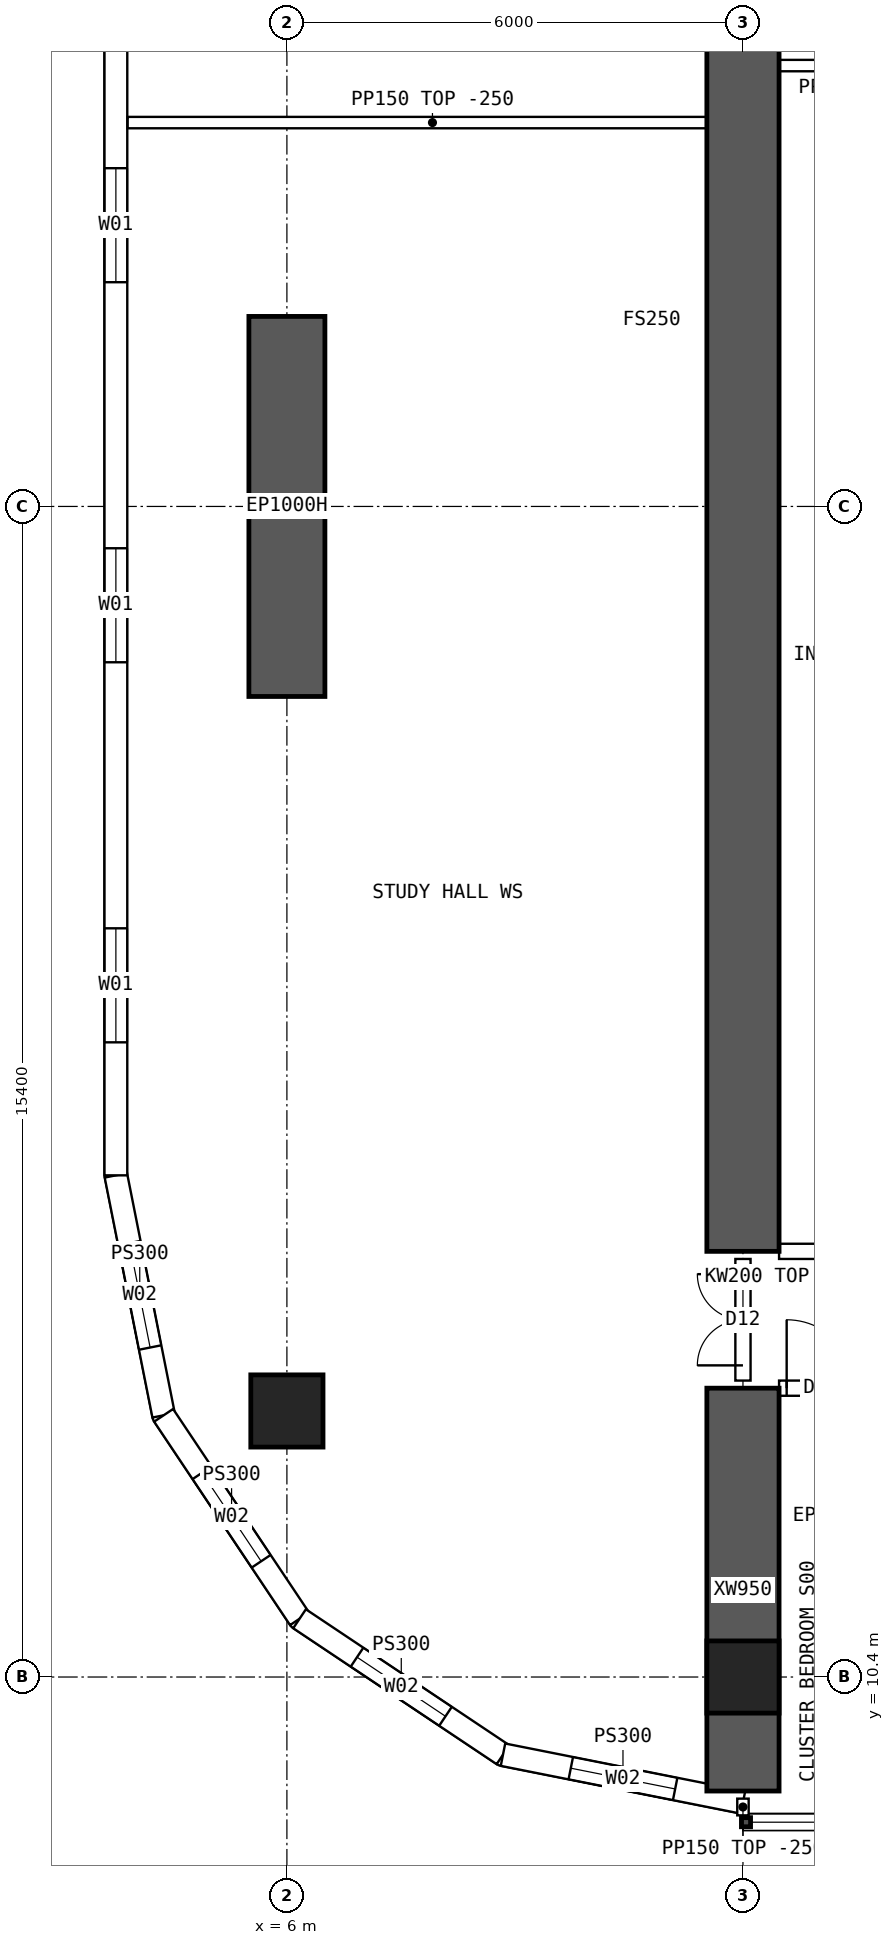
"""IFC4 building model, lengths in metres.
Left out: names, types, materials, properties, quantities, classifications, styles, units other than length and angle.
Written with IfcOpenShell. Run it as: python <this file> out.ifc"""

import sys

from ifc_helpers import new_model, si_unit, direction, frame, frame_2d, origin, origin_2d, place, context, subcontext, project, spatial, polyline, rectangle, hollow_rectangle, outline, extrude, element, fill, save


model = new_model("IFC4")
c1 = context("Model", 3, precision=1e-05, world=origin(), true_north=direction((0.0, 1.0)))
c2 = subcontext(c1, "Body", "Model", "MODEL_VIEW")
j1 = project(units=[si_unit("LENGTHUNIT", "METRE"), si_unit("PLANEANGLEUNIT", "RADIAN")], contexts=[c1])
p1 = place(None, origin())
s1 = spatial("IfcSite", under=j1, at=p1, CompositionType="ELEMENT")
p2 = place(p1, origin())
s2 = spatial("IfcBuilding", under=s1, at=p2, CompositionType="ELEMENT")
p3 = place(p2, frame((0.0, 0.0, 118.15)))
s3 = spatial("IfcBuildingStorey", under=s2, at=p3, CompositionType="ELEMENT", Elevation=118.15)
for number, where, z_axis, x_axis in (
    (1, (12.0, 10.4, 0.0), (0.0, 0.0, 1.0), (1.0, 0.0, 0.0)),
    (2, (6.0, 13.9, 0.0), (0.0, 0.0, 1.0), (1.0, 0.0, 0.0)),
):
    element("IfcColumn", number, at=place(p3, frame(where, z_axis=z_axis, x_axis=x_axis)), inside=s3, PredefinedType="COLUMN", context=c2, shape_type="SweptSolid", body=[
        extrude(hollow_rectangle(XDim=0.95, YDim=0.95, WallThickness=0.095, at=origin_2d()), origin(), (0.0, 0.0, 1.0), 3.75),
    ])
p4 = place(p3, frame((6.0, 23.3, 0.0), z_axis=(0.0, 0.0, 1.0), x_axis=(0.0, 1.0, 0.0)))
e3 = element("IfcWall", 3, at=p4, inside=s3, PredefinedType="SHEAR", context=c2, shape_type="SweptSolid", body=[
    extrude(rectangle(XDim=5.0, YDim=1.0, at=frame_2d((2.5, 0.0))), origin(), (0.0, 0.0, 1.0), 3.75),
])
p5 = place(p3, frame((12.0, 8.9, 0.0), z_axis=(0.0, 0.0, 1.0), x_axis=(0.0, 1.0, 0.0)))
e4 = element("IfcWall", 4, at=p5, inside=s3, PredefinedType="SHEAR", context=c2, shape_type="SweptSolid", body=[
    extrude(rectangle(XDim=5.3, YDim=0.95, at=frame_2d((2.65, 0.0))), origin(), (0.0, 0.0, 1.0), 3.75),
])
p6 = place(p3, frame((12.0, 16.0, 0.0), z_axis=(0.0, 0.0, 1.0), x_axis=(0.0, 1.0, 0.0)))
e5 = element("IfcWall", 5, at=p6, inside=s3, PredefinedType="SHEAR", context=c2, shape_type="SweptSolid", body=[
    extrude(rectangle(XDim=32.0, YDim=0.95, at=frame_2d((16.0, 0.0))), origin(), (0.0, 0.0, 1.0), 3.75),
])
p7 = place(p3, frame((3.75, 47.0, 0.0), z_axis=(0.0, 0.0, 1.0), x_axis=(0.0, -1.0, 0.0)))
e6 = element("IfcWall", 6, at=p7, inside=s3, PredefinedType="SOLIDWALL", context=c2, shape_type="SweptSolid", body=[
    extrude(outline(polyline([(-0.015, -0.15), (30.015, -0.15), (29.985, 0.15), (0.015, 0.15), (-0.015, -0.15)])), origin(), (0.0, 0.0, 1.0), 3.5),
])
p8 = place(p7, frame((1.75, 0.0, 0.9)))
e7 = element("IfcOpeningElement", 7, at=p8, cuts=e6, PredefinedType="OPENING", context=c2, shape_type="SweptSolid", body=[
    extrude(rectangle(XDim=1.5, YDim=2.0, at=frame_2d((0.75, 1.0))), frame((0.0, 0.16, 0.0), z_axis=(0.0, -1.0, 0.0), x_axis=(1.0, 0.0, 0.0)), (0.0, 0.0, 1.0), 0.32),
])
p9 = place(p7, frame((6.75, 0.0, 0.9)))
e8 = element("IfcOpeningElement", 8, at=p9, cuts=e6, PredefinedType="OPENING", context=c2, shape_type="SweptSolid", body=[
    extrude(rectangle(XDim=1.5, YDim=2.0, at=frame_2d((0.75, 1.0))), frame((0.0, 0.16, 0.0), z_axis=(0.0, -1.0, 0.0), x_axis=(1.0, 0.0, 0.0)), (0.0, 0.0, 1.0), 0.32),
])
p10 = place(p7, frame((11.75, 0.0, 0.9)))
e9 = element("IfcOpeningElement", 9, at=p10, cuts=e6, PredefinedType="OPENING", context=c2, shape_type="SweptSolid", body=[
    extrude(rectangle(XDim=1.5, YDim=2.0, at=frame_2d((0.75, 1.0))), frame((0.0, 0.16, 0.0), z_axis=(0.0, -1.0, 0.0), x_axis=(1.0, 0.0, 0.0)), (0.0, 0.0, 1.0), 0.32),
])
p11 = place(p7, frame((16.75, 0.0, 0.9)))
e10 = element("IfcOpeningElement", 10, at=p11, cuts=e6, PredefinedType="OPENING", context=c2, shape_type="SweptSolid", body=[
    extrude(rectangle(XDim=1.5, YDim=2.0, at=frame_2d((0.75, 1.0))), frame((0.0, 0.16, 0.0), z_axis=(0.0, -1.0, 0.0), x_axis=(1.0, 0.0, 0.0)), (0.0, 0.0, 1.0), 0.32),
])
p12 = place(p7, frame((21.75, 0.0, 0.9)))
e11 = element("IfcOpeningElement", 11, at=p12, cuts=e6, PredefinedType="OPENING", context=c2, shape_type="SweptSolid", body=[
    extrude(rectangle(XDim=1.5, YDim=2.0, at=frame_2d((0.75, 1.0))), frame((0.0, 0.16, 0.0), z_axis=(0.0, -1.0, 0.0), x_axis=(1.0, 0.0, 0.0)), (0.0, 0.0, 1.0), 0.32),
])
p13 = place(p7, frame((26.75, 0.0, 0.9)))
e12 = element("IfcOpeningElement", 12, at=p13, cuts=e6, PredefinedType="OPENING", context=c2, shape_type="SweptSolid", body=[
    extrude(rectangle(XDim=1.5, YDim=2.0, at=frame_2d((0.75, 1.0))), frame((0.0, 0.16, 0.0), z_axis=(0.0, -1.0, 0.0), x_axis=(1.0, 0.0, 0.0)), (0.0, 0.0, 1.0), 0.32),
])
p14 = place(p3, frame((3.75, 17.0, 0.0), z_axis=(0.0, 0.0, 1.0), x_axis=(0.195080412259, -0.980787251524, 0.0)))
e13 = element("IfcWall", 13, at=p14, inside=s3, PredefinedType="SOLIDWALL", context=c2, shape_type="SweptSolid", body=[
    extrude(outline(polyline([(-0.015, -0.15), (3.249, -0.15), (3.189, 0.15), (0.015, 0.15), (-0.015, -0.15)])), origin(), (0.0, 0.0, 1.0), 3.5),
])
p15 = place(p14, frame((0.909, 0.0, 0.9)))
e14 = element("IfcOpeningElement", 14, at=p15, cuts=e13, PredefinedType="OPENING", context=c2, shape_type="SweptSolid", body=[
    extrude(rectangle(XDim=1.4, YDim=1.8, at=frame_2d((0.7, 0.9))), frame((0.0, 0.16, 0.0), z_axis=(0.0, -1.0, 0.0), x_axis=(1.0, 0.0, 0.0)), (0.0, 0.0, 1.0), 0.32),
])
p16 = place(p3, frame((4.378, 13.843, 0.0), z_axis=(0.0, 0.0, 1.0), x_axis=(0.555609954424, -0.831443069936, 0.0)))
e15 = element("IfcWall", 15, at=p16, inside=s3, PredefinedType="SOLIDWALL", context=c2, shape_type="SweptSolid", body=[
    extrude(outline(polyline([(-0.03, -0.15), (3.249, -0.15), (3.189, 0.15), (0.03, 0.15), (-0.03, -0.15)])), origin(), (0.0, 0.0, 1.0), 3.5),
])
p17 = place(p16, frame((0.909, 0.0, 0.9)))
e16 = element("IfcOpeningElement", 16, at=p17, cuts=e15, PredefinedType="OPENING", context=c2, shape_type="SweptSolid", body=[
    extrude(rectangle(XDim=1.4, YDim=1.8, at=frame_2d((0.7, 0.9))), frame((0.0, 0.16, 0.0), z_axis=(0.0, -1.0, 0.0), x_axis=(1.0, 0.0, 0.0)), (0.0, 0.0, 1.0), 0.32),
])
p18 = place(p3, frame((6.167, 11.167, 0.0), z_axis=(0.0, 0.0, 1.0), x_axis=(0.831443069936, -0.555609954424, 0.0)))
e17 = element("IfcWall", 17, at=p18, inside=s3, PredefinedType="SOLIDWALL", context=c2, shape_type="SweptSolid", body=[
    extrude(outline(polyline([(-0.03, -0.15), (3.249, -0.15), (3.189, 0.15), (0.03, 0.15), (-0.03, -0.15)])), origin(), (0.0, 0.0, 1.0), 3.5),
])
p19 = place(p18, frame((0.909, 0.0, 0.9)))
e18 = element("IfcOpeningElement", 18, at=p19, cuts=e17, PredefinedType="OPENING", context=c2, shape_type="SweptSolid", body=[
    extrude(rectangle(XDim=1.4, YDim=1.8, at=frame_2d((0.7, 0.9))), frame((0.0, 0.16, 0.0), z_axis=(0.0, -1.0, 0.0), x_axis=(1.0, 0.0, 0.0)), (0.0, 0.0, 1.0), 0.32),
])
p20 = place(p3, frame((8.843, 9.378, 0.0), z_axis=(0.0, 0.0, 1.0), x_axis=(0.980787251524, -0.195080412259, 0.0)))
e19 = element("IfcWall", 19, at=p20, inside=s3, PredefinedType="SOLIDWALL", context=c2, shape_type="SweptSolid", body=[
    extrude(outline(polyline([(-0.03, -0.15), (3.249, -0.15), (3.189, 0.15), (0.03, 0.15), (-0.03, -0.15)])), origin(), (0.0, 0.0, 1.0), 3.5),
])
p21 = place(p20, frame((0.909, 0.0, 0.9)))
e20 = element("IfcOpeningElement", 20, at=p21, cuts=e19, PredefinedType="OPENING", context=c2, shape_type="SweptSolid", body=[
    extrude(rectangle(XDim=1.4, YDim=1.8, at=frame_2d((0.7, 0.9))), frame((0.0, 0.16, 0.0), z_axis=(0.0, -1.0, 0.0), x_axis=(1.0, 0.0, 0.0)), (0.0, 0.0, 1.0), 0.32),
])
p22 = place(p3, frame((12.475, 14.2, 0.0), z_axis=(0.0, 0.0, 1.0), x_axis=(1.0, 0.0, 0.0)))
e21 = element("IfcWall", 21, at=p22, inside=s3, PredefinedType="SOLIDWALL", context=c2, shape_type="SweptSolid", body=[
    extrude(outline(polyline([(0.0, 0.0), (5.05, 0.0), (5.05, 3.1), (0.0, 3.1), (0.0, 0.0)])), frame((0.0, 0.1, 0.0), z_axis=(0.0, -1.0, 0.0), x_axis=(1.0, 0.0, 0.0)), (0.0, 0.0, 1.0), 0.2),
])
p23 = place(p22, frame((0.1, 0.0, 0.0)))
e22 = element("IfcOpeningElement", 22, at=p23, cuts=e21, PredefinedType="OPENING", context=c2, shape_type="SweptSolid", body=[
    extrude(rectangle(XDim=0.9, YDim=2.1, at=frame_2d((0.45, 1.05))), frame((0.0, 0.11, 0.0), z_axis=(0.0, -1.0, 0.0), x_axis=(1.0, 0.0, 0.0)), (0.0, 0.0, 1.0), 0.22),
])
p24 = place(p22, frame((3.9, 0.0, 0.0)))
e23 = element("IfcOpeningElement", 23, at=p24, cuts=e21, PredefinedType="OPENING", context=c2, shape_type="SweptSolid", body=[
    extrude(rectangle(XDim=0.9, YDim=2.1, at=frame_2d((0.45, 1.05))), frame((0.0, 0.11, 0.0), z_axis=(0.0, -1.0, 0.0), x_axis=(1.0, 0.0, 0.0)), (0.0, 0.0, 1.0), 0.22),
])
p25 = place(p3, frame((12.475, 16.0, 0.0), z_axis=(0.0, 0.0, 1.0), x_axis=(1.0, 0.0, 0.0)))
e24 = element("IfcWall", 24, at=p25, inside=s3, PredefinedType="SOLIDWALL", context=c2, shape_type="SweptSolid", body=[
    extrude(rectangle(XDim=5.05, YDim=0.2, at=frame_2d((2.525, 0.0))), origin(), (0.0, 0.0, 1.0), 3.5),
])
p26 = place(p25, frame((3.325, 0.0, 0.0)))
e25 = element("IfcOpeningElement", 25, at=p26, cuts=e24, PredefinedType="OPENING", context=c2, shape_type="SweptSolid", body=[
    extrude(rectangle(XDim=1.6, YDim=2.1, at=frame_2d((0.8, 1.05))), frame((0.0, 0.11, 0.0), z_axis=(0.0, -1.0, 0.0), x_axis=(1.0, 0.0, 0.0)), (0.0, 0.0, 1.0), 0.22),
])
p27 = place(p3, frame((12.0, 31.6, 0.0), z_axis=(0.0, 0.0, 1.0), x_axis=(1.0, 0.0, 0.0)))
e26 = element("IfcWall", 26, at=p27, inside=s3, PredefinedType="PARTITIONING", context=c2, shape_type="SweptSolid", body=[
    extrude(rectangle(XDim=3.6, YDim=0.15, at=frame_2d((1.8, 0.0))), origin(), (0.0, 0.0, 1.0), 3.5),
])
p28 = place(p3, frame((3.905, 30.85, 0.0), z_axis=(0.0, 0.0, 1.0), x_axis=(1.0, 0.0, 0.0)))
e27 = element("IfcWall", 27, at=p28, inside=s3, PredefinedType="PARTITIONING", context=c2, shape_type="SweptSolid", body=[
    extrude(outline(polyline([(0.0, 0.0), (8.02, 0.0), (8.02, 3.5), (2.397, 3.5), (2.395, 3.05), (1.797, 3.05), (1.795, 3.5), (0.0, 3.5), (0.0, 0.0)])), frame((0.0, 0.075, 0.0), z_axis=(0.0, -1.0, 0.0), x_axis=(1.0, 0.0, 0.0)), (0.0, 0.0, 1.0), 0.15),
])
p29 = place(p3, frame((12.0, 14.3, 0.0), z_axis=(0.0, 0.0, 1.0), x_axis=(0.0, 1.0, 0.0)))
e28 = element("IfcWall", 28, at=p29, inside=s3, PredefinedType="SOLIDWALL", context=c2, shape_type="SweptSolid", body=[
    extrude(outline(polyline([(0.0, 0.0), (1.6, 0.0), (1.6, 3.1), (0.0, 3.1), (0.0, 0.0)])), frame((0.0, 0.1, 0.0), z_axis=(0.0, -1.0, 0.0), x_axis=(1.0, 0.0, 0.0)), (0.0, 0.0, 1.0), 0.2),
])
p30 = place(p29, frame((0.2, 0.0, 0.0)))
e29 = element("IfcOpeningElement", 29, at=p30, cuts=e28, PredefinedType="OPENING", context=c2, shape_type="SweptSolid", body=[
    extrude(rectangle(XDim=1.2, YDim=2.1, at=frame_2d((0.6, 1.05))), frame((0.0, 0.11, 0.0), z_axis=(0.0, -1.0, 0.0), x_axis=(1.0, 0.0, 0.0)), (0.0, 0.0, 1.0), 0.22),
])
p31 = place(p3, frame((12.0, 8.8, 0.0), z_axis=(0.0, 0.0, 1.0), x_axis=(0.0, -1.0, 0.0)))
e30 = element("IfcWall", 30, at=p31, inside=s3, PredefinedType="PARTITIONING", context=c2, shape_type="SweptSolid", body=[
    extrude(rectangle(XDim=0.22, YDim=0.15, at=frame_2d((0.11, 0.0))), origin(), (0.0, 0.0, 1.0), 3.5),
])
p32 = place(p11, origin())
e31 = element("IfcWindow", 31, at=p32, inside=s3, PartitioningType="SINGLE_PANEL", PredefinedType="WINDOW", context=c2, shape_type="SweptSolid", body=[
    extrude(rectangle(XDim=1.5, YDim=2.0, at=frame_2d((0.75, 1.0))), frame((0.0, 0.03, 0.0), z_axis=(0.0, -1.0, 0.0), x_axis=(1.0, 0.0, 0.0)), (0.0, 0.0, 1.0), 0.06),
])
fill(e10, e31)
p33 = place(p12, origin())
e32 = element("IfcWindow", 32, at=p33, inside=s3, PartitioningType="SINGLE_PANEL", PredefinedType="WINDOW", context=c2, shape_type="SweptSolid", body=[
    extrude(rectangle(XDim=1.5, YDim=2.0, at=frame_2d((0.75, 1.0))), frame((0.0, 0.03, 0.0), z_axis=(0.0, -1.0, 0.0), x_axis=(1.0, 0.0, 0.0)), (0.0, 0.0, 1.0), 0.06),
])
fill(e11, e32)
p34 = place(p13, origin())
e33 = element("IfcWindow", 33, at=p34, inside=s3, PartitioningType="SINGLE_PANEL", PredefinedType="WINDOW", context=c2, shape_type="SweptSolid", body=[
    extrude(rectangle(XDim=1.5, YDim=2.0, at=frame_2d((0.75, 1.0))), frame((0.0, 0.03, 0.0), z_axis=(0.0, -1.0, 0.0), x_axis=(1.0, 0.0, 0.0)), (0.0, 0.0, 1.0), 0.06),
])
fill(e12, e33)
p35 = place(p15, origin())
e34 = element("IfcWindow", 34, at=p35, inside=s3, PartitioningType="SINGLE_PANEL", PredefinedType="WINDOW", context=c2, shape_type="SweptSolid", body=[
    extrude(rectangle(XDim=1.4, YDim=1.8, at=frame_2d((0.7, 0.9))), frame((0.0, 0.03, 0.0), z_axis=(0.0, -1.0, 0.0), x_axis=(1.0, 0.0, 0.0)), (0.0, 0.0, 1.0), 0.06),
])
fill(e14, e34)
p36 = place(p17, origin())
e35 = element("IfcWindow", 35, at=p36, inside=s3, PartitioningType="SINGLE_PANEL", PredefinedType="WINDOW", context=c2, shape_type="SweptSolid", body=[
    extrude(rectangle(XDim=1.4, YDim=1.8, at=frame_2d((0.7, 0.9))), frame((0.0, 0.03, 0.0), z_axis=(0.0, -1.0, 0.0), x_axis=(1.0, 0.0, 0.0)), (0.0, 0.0, 1.0), 0.06),
])
fill(e16, e35)
p37 = place(p19, origin())
e36 = element("IfcWindow", 36, at=p37, inside=s3, PartitioningType="SINGLE_PANEL", PredefinedType="WINDOW", context=c2, shape_type="SweptSolid", body=[
    extrude(rectangle(XDim=1.4, YDim=1.8, at=frame_2d((0.7, 0.9))), frame((0.0, 0.03, 0.0), z_axis=(0.0, -1.0, 0.0), x_axis=(1.0, 0.0, 0.0)), (0.0, 0.0, 1.0), 0.06),
])
fill(e18, e36)
p38 = place(p21, origin())
e37 = element("IfcWindow", 37, at=p38, inside=s3, PartitioningType="SINGLE_PANEL", PredefinedType="WINDOW", context=c2, shape_type="SweptSolid", body=[
    extrude(rectangle(XDim=1.4, YDim=1.8, at=frame_2d((0.7, 0.9))), frame((0.0, 0.03, 0.0), z_axis=(0.0, -1.0, 0.0), x_axis=(1.0, 0.0, 0.0)), (0.0, 0.0, 1.0), 0.06),
])
fill(e20, e37)
p39 = place(p23, origin())
e38 = element("IfcDoor", 38, at=p39, inside=s3, OperationType="SINGLE_SWING_LEFT", PredefinedType="DOOR", context=c2, shape_type="SweptSolid", body=[
    extrude(rectangle(XDim=0.9, YDim=2.1, at=frame_2d((0.45, 1.05))), frame((0.0, 0.025, 0.0), z_axis=(0.0, -1.0, 0.0), x_axis=(1.0, 0.0, 0.0)), (0.0, 0.0, 1.0), 0.05),
])
fill(e22, e38)
p40 = place(p30, origin())
e39 = element("IfcDoor", 39, at=p40, inside=s3, OperationType="DOUBLE_DOOR_SINGLE_SWING", PredefinedType="DOOR", context=c2, shape_type="SweptSolid", body=[
    extrude(rectangle(XDim=1.2, YDim=2.1, at=frame_2d((0.6, 1.05))), frame((0.0, 0.025, 0.0), z_axis=(0.0, -1.0, 0.0), x_axis=(1.0, 0.0, 0.0)), (0.0, 0.0, 1.0), 0.05),
])
fill(e29, e39)
save(model, sys.argv[1])
